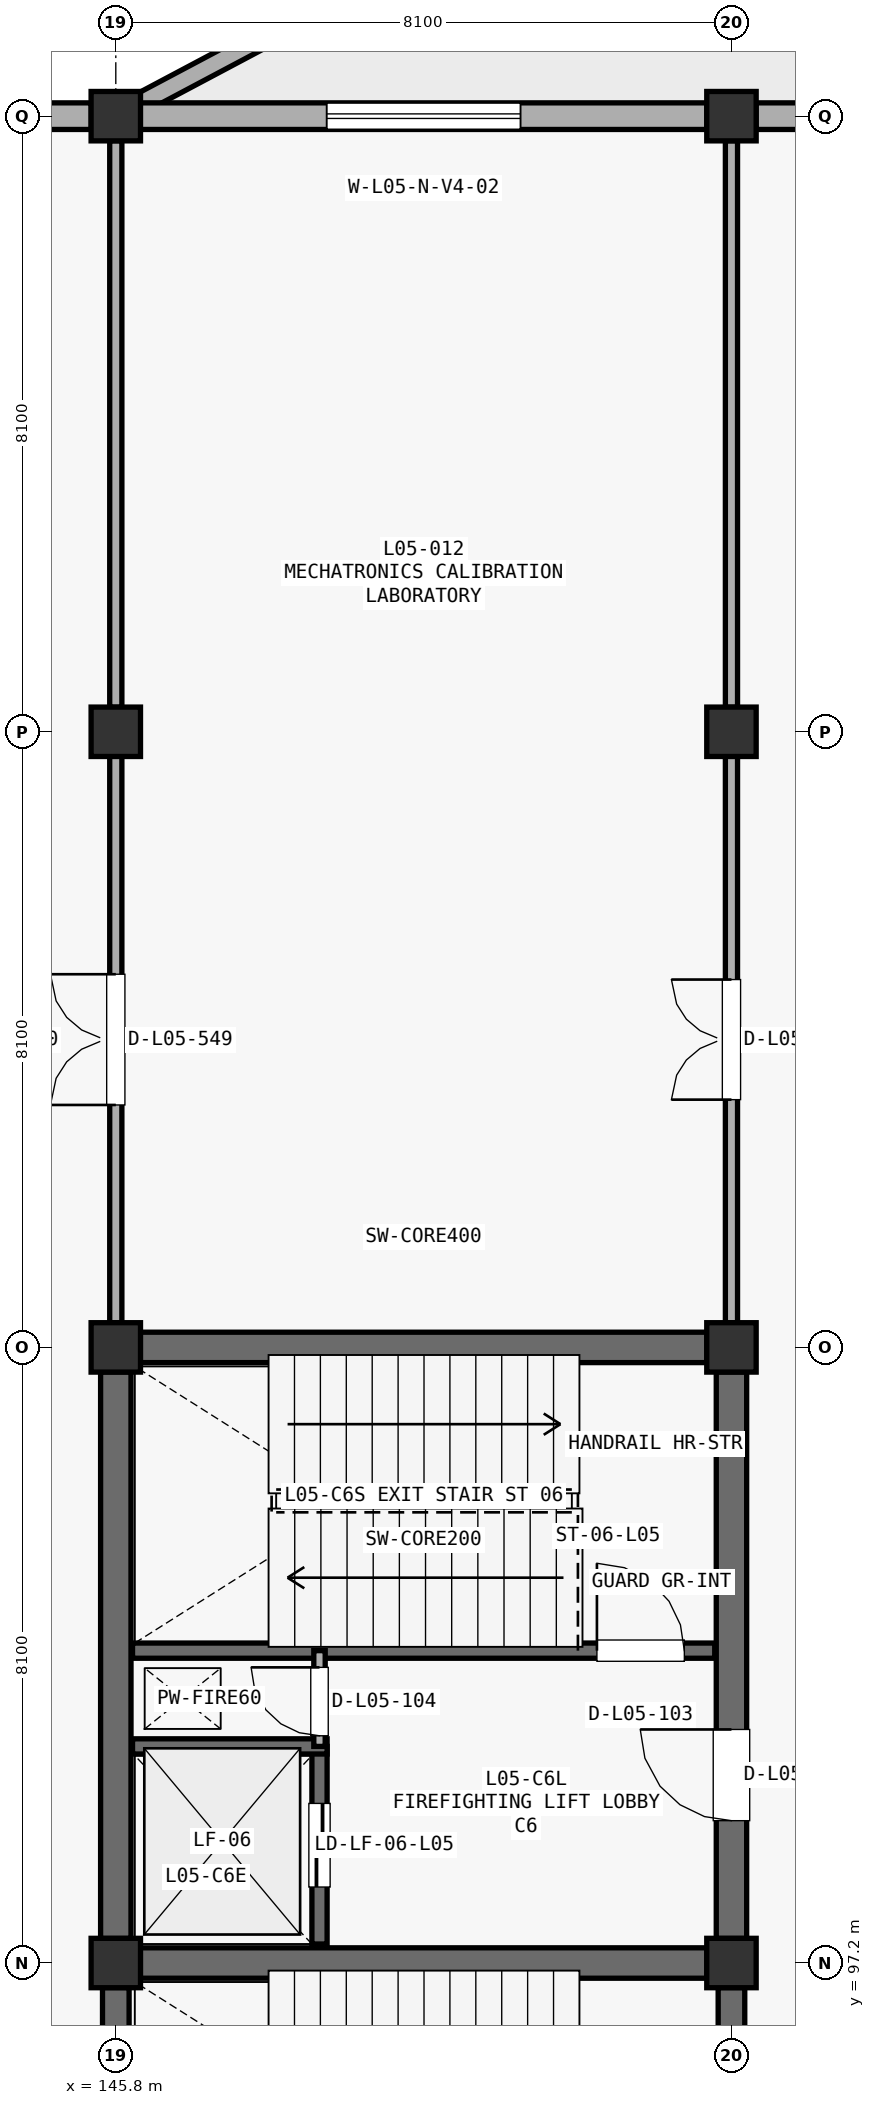
"""IFC4 building model, lengths in metres.
Left out: names, types, materials, properties, quantities, classifications, styles, units other than length and angle.
Written with IfcOpenShell. Run it as: python <this file> out.ifc"""

import sys

from ifc_helpers import new_model, si_unit, direction, frame, frame_2d, origin, origin_2d, place, context, subcontext, project, spatial, polyline, rectangle, outline, extrude, element, fill, save


model = new_model("IFC4")
c1 = context("Model", 3, precision=1e-05, world=origin(), true_north=direction((0.0, 1.0)))
c2 = subcontext(c1, "Body", "Model", "MODEL_VIEW")
j1 = project(units=[si_unit("LENGTHUNIT", "METRE"), si_unit("PLANEANGLEUNIT", "RADIAN")], contexts=[c1])
p1 = place(None, origin())
s1 = spatial("IfcSite", under=j1, at=p1, CompositionType="ELEMENT")
p2 = place(p1, origin())
s2 = spatial("IfcBuilding", under=s1, at=p2, CompositionType="ELEMENT")
p3 = place(p2, frame((0.0, 0.0, 22.95)))
s3 = spatial("IfcBuildingStorey", under=s2, at=p3, CompositionType="ELEMENT", Elevation=22.95)
for number, where, z_axis, x_axis in (
    (1, (145.8, 97.2, 0.0), (0.0, 0.0, 1.0), (1.0, 0.0, 0.0)),
    (2, (145.8, 105.3, 0.0), (0.0, 0.0, 1.0), (1.0, 0.0, 0.0)),
    (3, (145.8, 113.4, 0.0), (0.0, 0.0, 1.0), (1.0, 0.0, 0.0)),
    (4, (145.8, 121.5, 0.0), (0.0, 0.0, 1.0), (1.0, 0.0, 0.0)),
    (5, (153.9, 97.2, 0.0), (0.0, 0.0, 1.0), (1.0, 0.0, 0.0)),
    (6, (153.9, 105.3, 0.0), (0.0, 0.0, 1.0), (1.0, 0.0, 0.0)),
    (7, (153.9, 113.4, 0.0), (0.0, 0.0, 1.0), (1.0, 0.0, 0.0)),
    (8, (153.9, 121.5, 0.0), (0.0, 0.0, 1.0), (1.0, 0.0, 0.0)),
):
    element("IfcColumn", number, at=place(p3, frame(where, z_axis=z_axis, x_axis=x_axis)), inside=s3, PredefinedType="COLUMN", context=c2, shape_type="SweptSolid", body=[
        extrude(rectangle(XDim=0.65, YDim=0.65, at=origin_2d()), origin(), (0.0, 0.0, 1.0), 4.42),
    ])
p4 = place(p3, frame((145.818, 121.51, -0.35), z_axis=(0.0, 0.0, 1.0), x_axis=(0.883268347522, 0.468867813211, 0.0)))
e9 = element("IfcWall", 9, at=p4, inside=s3, PredefinedType="STANDARD", context=c2, shape_type="SweptSolid", body=[
    extrude(outline(polyline([(0.0, 0.0), (9.131, 0.0), (9.131, 1.445), (0.0, 0.345), (0.0, 0.0)])), frame((0.0, 0.13, 0.0), z_axis=(0.0, -1.0, 0.0), x_axis=(1.0, 0.0, 0.0)), (0.0, 0.0, 1.0), 0.26),
])
p5 = place(p3, frame((138.023, 121.5, 0.0), z_axis=(0.0, 0.0, 1.0), x_axis=(1.0, 0.0, 0.0)))
e10 = element("IfcWall", 10, at=p5, inside=s3, PredefinedType="STANDARD", context=c2, shape_type="SweptSolid", body=[
    extrude(rectangle(XDim=7.454, YDim=0.35, at=frame_2d((3.727, 0.0))), origin(), (0.0, 0.0, 1.0), 3.312),
])
p6 = place(p5, frame((2.602, 0.0, 0.85)))
e11 = element("IfcOpeningElement", 11, at=p6, cuts=e10, PredefinedType="OPENING", context=c2, shape_type="SweptSolid", body=[
    extrude(rectangle(XDim=2.25, YDim=1.75, at=frame_2d((1.125, 0.875))), frame((0.0, 0.185, 0.0), z_axis=(0.0, -1.0, 0.0), x_axis=(1.0, 0.0, 0.0)), (0.0, 0.0, 1.0), 0.37),
])
p7 = place(p3, frame((146.123, 121.5, 0.0), z_axis=(0.0, 0.0, 1.0), x_axis=(1.0, 0.0, 0.0)))
e12 = element("IfcWall", 12, at=p7, inside=s3, PredefinedType="STANDARD", context=c2, shape_type="SweptSolid", body=[
    extrude(rectangle(XDim=7.454, YDim=0.35, at=frame_2d((3.727, 0.0))), origin(), (0.0, 0.0, 1.0), 3.512),
])
p8 = place(p7, frame((2.452, 0.0, 0.85)))
e13 = element("IfcOpeningElement", 13, at=p8, cuts=e12, PredefinedType="OPENING", context=c2, shape_type="SweptSolid", body=[
    extrude(rectangle(XDim=2.55, YDim=1.75, at=frame_2d((1.275, 0.875))), frame((0.0, 0.185, 0.0), z_axis=(0.0, -1.0, 0.0), x_axis=(1.0, 0.0, 0.0)), (0.0, 0.0, 1.0), 0.37),
])
p9 = place(p3, frame((154.223, 121.5, 0.0), z_axis=(0.0, 0.0, 1.0), x_axis=(1.0, 0.0, 0.0)))
e14 = element("IfcWall", 14, at=p9, inside=s3, PredefinedType="STANDARD", context=c2, shape_type="SweptSolid", body=[
    extrude(rectangle(XDim=7.454, YDim=0.35, at=frame_2d((3.727, 0.0))), origin(), (0.0, 0.0, 1.0), 3.412),
])
p10 = place(p9, frame((2.752, 0.0, 0.85)))
e15 = element("IfcOpeningElement", 15, at=p10, cuts=e14, PredefinedType="OPENING", context=c2, shape_type="SweptSolid", body=[
    extrude(rectangle(XDim=1.95, YDim=1.75, at=frame_2d((0.975, 0.875))), frame((0.0, 0.185, 0.0), z_axis=(0.0, -1.0, 0.0), x_axis=(1.0, 0.0, 0.0)), (0.0, 0.0, 1.0), 0.37),
])
p11 = place(p3, frame((146.123, 105.3, 0.0), z_axis=(0.0, 0.0, 1.0), x_axis=(1.0, 0.0, 0.0)))
e16 = element("IfcWall", 16, at=p11, inside=s3, PredefinedType="SHEAR", context=c2, shape_type="SweptSolid", body=[
    extrude(rectangle(XDim=7.454, YDim=0.4, at=frame_2d((3.727, 0.0))), origin(), (0.0, 0.0, 1.0), 4.162),
])
p12 = place(p3, frame((145.8, 97.523, 0.0), z_axis=(0.0, 0.0, 1.0), x_axis=(0.0, 1.0, 0.0)))
e17 = element("IfcWall", 17, at=p12, inside=s3, PredefinedType="SHEAR", context=c2, shape_type="SweptSolid", body=[
    extrude(rectangle(XDim=7.454, YDim=0.4, at=frame_2d((3.727, 0.0))), origin(), (0.0, 0.0, 1.0), 4.162),
])
p13 = place(p3, frame((153.9, 97.523, 0.0), z_axis=(0.0, 0.0, 1.0), x_axis=(0.0, 1.0, 0.0)))
e18 = element("IfcWall", 18, at=p13, inside=s3, PredefinedType="SHEAR", context=c2, shape_type="SweptSolid", body=[
    extrude(rectangle(XDim=7.454, YDim=0.4, at=frame_2d((3.727, 0.0))), origin(), (0.0, 0.0, 1.0), 4.162),
])
p14 = place(p13, frame((1.55, 0.0, 0.0)))
e19 = element("IfcOpeningElement", 19, at=p14, cuts=e18, PredefinedType="OPENING", context=c2, shape_type="SweptSolid", body=[
    extrude(rectangle(XDim=1.2, YDim=2.2, at=frame_2d((0.6, 1.1))), frame((0.0, 0.21, 0.0), z_axis=(0.0, -1.0, 0.0), x_axis=(1.0, 0.0, 0.0)), (0.0, 0.0, 1.0), 0.42),
])
p15 = place(p3, frame((146.123, 97.2, 0.0), z_axis=(0.0, 0.0, 1.0), x_axis=(1.0, 0.0, 0.0)))
e20 = element("IfcWall", 20, at=p15, inside=s3, PredefinedType="SHEAR", context=c2, shape_type="SweptSolid", body=[
    extrude(rectangle(XDim=7.454, YDim=0.4, at=frame_2d((3.727, 0.0))), origin(), (0.0, 0.0, 1.0), 4.162),
])
p16 = place(p3, frame((146.02, 101.31, 0.0), z_axis=(0.0, 0.0, 1.0), x_axis=(1.0, 0.0, 0.0)))
e21 = element("IfcWall", 21, at=p16, inside=s3, PredefinedType="SHEAR", context=c2, shape_type="SweptSolid", body=[
    extrude(rectangle(XDim=7.66, YDim=0.2, at=frame_2d((3.83, 0.0))), origin(), (0.0, 0.0, 1.0), 4.162),
])
p17 = place(p16, frame((6.11, 0.0, 0.0)))
e22 = element("IfcOpeningElement", 22, at=p17, cuts=e21, PredefinedType="OPENING", context=c2, shape_type="SweptSolid", body=[
    extrude(rectangle(XDim=1.15, YDim=2.2, at=frame_2d((0.575, 1.1))), frame((0.0, 0.11, 0.0), z_axis=(0.0, -1.0, 0.0), x_axis=(1.0, 0.0, 0.0)), (0.0, 0.0, 1.0), 0.22),
])
p18 = place(p3, frame((148.48, 97.45, 0.0), z_axis=(0.0, 0.0, 1.0), x_axis=(0.0, 1.0, 0.0)))
e23 = element("IfcWall", 23, at=p18, inside=s3, PredefinedType="SHEAR", context=c2, shape_type="SweptSolid", body=[
    extrude(rectangle(XDim=2.6, YDim=0.2, at=frame_2d((1.3, 0.0))), origin(), (0.0, 0.0, 1.0), 4.162),
])
p19 = place(p18, frame((0.75, 0.0, 0.0)))
e24 = element("IfcOpeningElement", 24, at=p19, cuts=e23, PredefinedType="OPENING", context=c2, shape_type="SweptSolid", body=[
    extrude(rectangle(XDim=1.1, YDim=2.2, at=frame_2d((0.55, 1.1))), frame((0.0, 0.11, 0.0), z_axis=(0.0, -1.0, 0.0), x_axis=(1.0, 0.0, 0.0)), (0.0, 0.0, 1.0), 0.22),
])
p20 = place(p3, frame((146.02, 100.05, 0.0), z_axis=(0.0, 0.0, 1.0), x_axis=(1.0, 0.0, 0.0)))
e25 = element("IfcWall", 25, at=p20, inside=s3, PredefinedType="SHEAR", context=c2, shape_type="SweptSolid", body=[
    extrude(rectangle(XDim=2.56, YDim=0.2, at=frame_2d((1.28, 0.0))), origin(), (0.0, 0.0, 1.0), 4.162),
])
p21 = place(p3, frame((148.48, 100.05, 0.0), z_axis=(0.0, 0.0, 1.0), x_axis=(0.0, 1.0, 0.0)))
e26 = element("IfcWall", 26, at=p21, inside=s3, PredefinedType="PARTITIONING", context=c2, shape_type="SweptSolid", body=[
    extrude(rectangle(XDim=1.26, YDim=0.15, at=frame_2d((0.63, 0.0))), origin(), (0.0, 0.0, 1.0), 4.162),
])
p22 = place(p21, frame((0.14, 0.0, 0.0)))
e27 = element("IfcOpeningElement", 27, at=p22, cuts=e26, PredefinedType="OPENING", context=c2, shape_type="SweptSolid", body=[
    extrude(rectangle(XDim=0.9, YDim=2.15, at=frame_2d((0.45, 1.075))), frame((0.0, 0.085, 0.0), z_axis=(0.0, -1.0, 0.0), x_axis=(1.0, 0.0, 0.0)), (0.0, 0.0, 1.0), 0.17),
])
p23 = place(p3, frame((145.8, 89.423, 0.0), z_axis=(0.0, 0.0, 1.0), x_axis=(0.0, 1.0, 0.0)))
e28 = element("IfcWall", 28, at=p23, inside=s3, PredefinedType="SHEAR", context=c2, shape_type="SweptSolid", body=[
    extrude(rectangle(XDim=7.454, YDim=0.35, at=frame_2d((3.727, 0.0))), origin(), (0.0, 0.0, 1.0), 4.162),
])
p24 = place(p3, frame((153.9, 89.423, 0.0), z_axis=(0.0, 0.0, 1.0), x_axis=(0.0, 1.0, 0.0)))
e29 = element("IfcWall", 29, at=p24, inside=s3, PredefinedType="SHEAR", context=c2, shape_type="SweptSolid", body=[
    extrude(rectangle(XDim=7.454, YDim=0.35, at=frame_2d((3.727, 0.0))), origin(), (0.0, 0.0, 1.0), 4.162),
])
p25 = place(p24, frame((1.55, 0.0, 0.0)))
e30 = element("IfcOpeningElement", 30, at=p25, cuts=e29, PredefinedType="OPENING", context=c2, shape_type="SweptSolid", body=[
    extrude(rectangle(XDim=1.2, YDim=2.2, at=frame_2d((0.6, 1.1))), frame((0.0, 0.185, 0.0), z_axis=(0.0, -1.0, 0.0), x_axis=(1.0, 0.0, 0.0)), (0.0, 0.0, 1.0), 0.37),
])
p26 = place(p3, frame((145.8, 105.623, 0.0), z_axis=(0.0, 0.0, 1.0), x_axis=(0.0, 1.0, 0.0)))
e31 = element("IfcWall", 31, at=p26, inside=s3, PredefinedType="PARTITIONING", context=c2, shape_type="SweptSolid", body=[
    extrude(rectangle(XDim=7.454, YDim=0.16, at=frame_2d((3.727, 0.0))), origin(), (0.0, 0.0, 1.0), 3.412),
])
p27 = place(p26, frame((2.867, 0.0, 0.0)))
e32 = element("IfcOpeningElement", 32, at=p27, cuts=e31, PredefinedType="OPENING", context=c2, shape_type="SweptSolid", body=[
    extrude(rectangle(XDim=1.72, YDim=2.3, at=frame_2d((0.86, 1.15))), frame((0.0, 0.09, 0.0), z_axis=(0.0, -1.0, 0.0), x_axis=(1.0, 0.0, 0.0)), (0.0, 0.0, 1.0), 0.18),
])
p28 = place(p3, frame((145.8, 113.723, 0.0), z_axis=(0.0, 0.0, 1.0), x_axis=(0.0, 1.0, 0.0)))
e33 = element("IfcWall", 33, at=p28, inside=s3, PredefinedType="PARTITIONING", context=c2, shape_type="SweptSolid", body=[
    extrude(rectangle(XDim=7.454, YDim=0.16, at=frame_2d((3.727, 0.0))), origin(), (0.0, 0.0, 1.0), 3.512),
])
p29 = place(p3, frame((153.9, 105.623, 0.0), z_axis=(0.0, 0.0, 1.0), x_axis=(0.0, 1.0, 0.0)))
e34 = element("IfcWall", 34, at=p29, inside=s3, PredefinedType="PARTITIONING", context=c2, shape_type="SweptSolid", body=[
    extrude(rectangle(XDim=7.454, YDim=0.16, at=frame_2d((3.727, 0.0))), origin(), (0.0, 0.0, 1.0), 3.562),
])
p30 = place(p29, frame((2.937, 0.0, 0.0)))
e35 = element("IfcOpeningElement", 35, at=p30, cuts=e34, PredefinedType="OPENING", context=c2, shape_type="SweptSolid", body=[
    extrude(rectangle(XDim=1.58, YDim=2.2, at=frame_2d((0.79, 1.1))), frame((0.0, 0.09, 0.0), z_axis=(0.0, -1.0, 0.0), x_axis=(1.0, 0.0, 0.0)), (0.0, 0.0, 1.0), 0.18),
])
p31 = place(p3, frame((153.9, 113.723, 0.0), z_axis=(0.0, 0.0, 1.0), x_axis=(0.0, 1.0, 0.0)))
e36 = element("IfcWall", 36, at=p31, inside=s3, PredefinedType="PARTITIONING", context=c2, shape_type="SweptSolid", body=[
    extrude(rectangle(XDim=7.454, YDim=0.16, at=frame_2d((3.727, 0.0))), origin(), (0.0, 0.0, 1.0), 3.312),
])
p32 = place(p8, origin())
e37 = element("IfcWindow", 37, at=p32, inside=s3, PartitioningType="SINGLE_PANEL", PredefinedType="WINDOW", context=c2, shape_type="SweptSolid", body=[
    extrude(rectangle(XDim=2.55, YDim=1.75, at=frame_2d((1.275, 0.875))), frame((0.0, 0.03, 0.0), z_axis=(0.0, -1.0, 0.0), x_axis=(1.0, 0.0, 0.0)), (0.0, 0.0, 1.0), 0.06),
])
fill(e13, e37)
p33 = place(p14, origin())
e38 = element("IfcDoor", 38, at=p33, inside=s3, OperationType="SINGLE_SWING_RIGHT", PredefinedType="DOOR", context=c2, shape_type="SweptSolid", body=[
    extrude(rectangle(XDim=1.2, YDim=2.2, at=frame_2d((0.6, 1.1))), frame((0.0, 0.025, 0.0), z_axis=(0.0, -1.0, 0.0), x_axis=(1.0, 0.0, 0.0)), (0.0, 0.0, 1.0), 0.05),
])
fill(e19, e38)
p34 = place(p17, origin())
e39 = element("IfcDoor", 39, at=p34, inside=s3, OperationType="SINGLE_SWING_LEFT", PredefinedType="DOOR", context=c2, shape_type="SweptSolid", body=[
    extrude(rectangle(XDim=1.15, YDim=2.2, at=frame_2d((0.575, 1.1))), frame((0.0, 0.025, 0.0), z_axis=(0.0, -1.0, 0.0), x_axis=(1.0, 0.0, 0.0)), (0.0, 0.0, 1.0), 0.05),
])
fill(e22, e39)
p35 = place(p19, origin())
e40 = element("IfcDoor", 40, at=p35, inside=s3, OperationType="SLIDING_TO_LEFT", PredefinedType="DOOR", context=c2, shape_type="SweptSolid", body=[
    extrude(rectangle(XDim=1.1, YDim=2.2, at=frame_2d((0.55, 1.1))), frame((0.0, 0.025, 0.0), z_axis=(0.0, -1.0, 0.0), x_axis=(1.0, 0.0, 0.0)), (0.0, 0.0, 1.0), 0.05),
])
fill(e24, e40)
p36 = place(p22, origin())
e41 = element("IfcDoor", 41, at=p36, inside=s3, OperationType="SINGLE_SWING_RIGHT", PredefinedType="DOOR", context=c2, shape_type="SweptSolid", body=[
    extrude(rectangle(XDim=0.9, YDim=2.15, at=frame_2d((0.45, 1.075))), frame((0.0, 0.025, 0.0), z_axis=(0.0, -1.0, 0.0), x_axis=(1.0, 0.0, 0.0)), (0.0, 0.0, 1.0), 0.05),
])
fill(e27, e41)
p37 = place(p27, origin())
e42 = element("IfcDoor", 42, at=p37, inside=s3, OperationType="DOUBLE_SWING_LEFT", PredefinedType="DOOR", context=c2, shape_type="SweptSolid", body=[
    extrude(rectangle(XDim=1.72, YDim=2.3, at=frame_2d((0.86, 1.15))), frame((0.0, 0.025, 0.0), z_axis=(0.0, -1.0, 0.0), x_axis=(1.0, 0.0, 0.0)), (0.0, 0.0, 1.0), 0.05),
])
fill(e32, e42)
p38 = place(p30, origin())
e43 = element("IfcDoor", 43, at=p38, inside=s3, OperationType="DOUBLE_SWING_LEFT", PredefinedType="DOOR", context=c2, shape_type="SweptSolid", body=[
    extrude(rectangle(XDim=1.58, YDim=2.2, at=frame_2d((0.79, 1.1))), frame((0.0, 0.025, 0.0), z_axis=(0.0, -1.0, 0.0), x_axis=(1.0, 0.0, 0.0)), (0.0, 0.0, 1.0), 0.05),
])
fill(e35, e43)
save(model, sys.argv[1])
